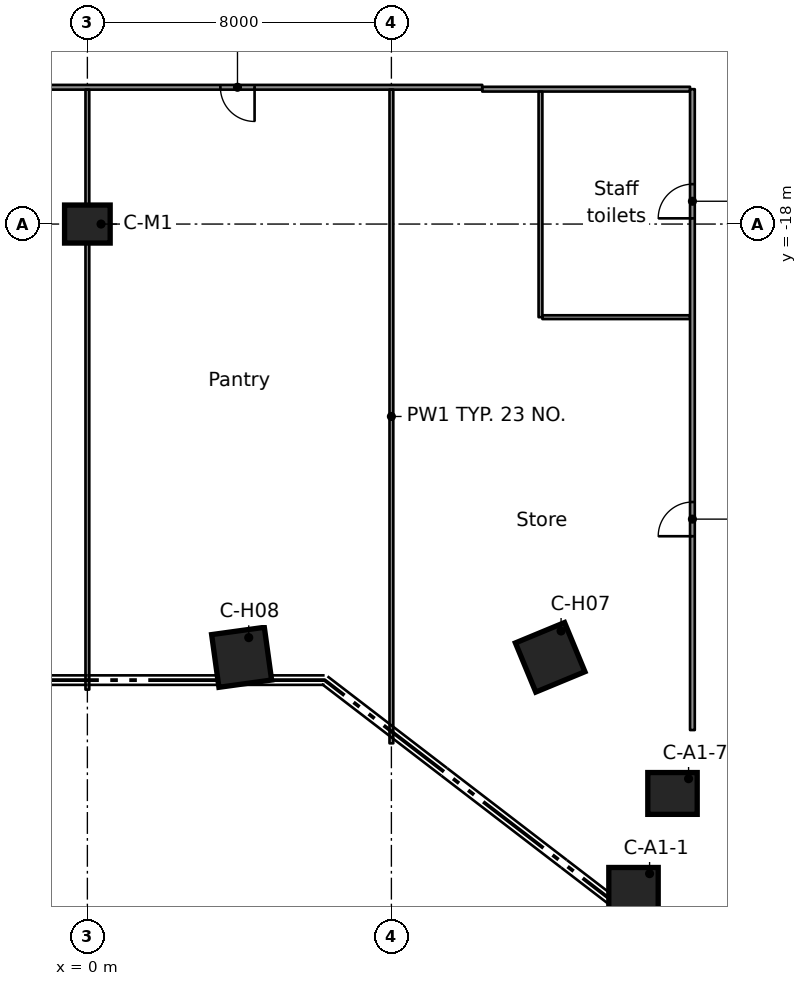
"""IFC4 building model, lengths in metres.
Left out: names, types, materials, properties, quantities, classifications, styles, units other than length and angle.
Written with IfcOpenShell. Run it as: python <this file> out.ifc"""

import sys

from ifc_helpers import new_model, si_unit, direction, frame, frame_2d, origin, origin_2d, place, context, subcontext, project, spatial, rectangle, extrude, element, fill, save


model = new_model("IFC4")
c1 = context("Model", 3, precision=1e-05, world=origin(), true_north=direction((0.0, 1.0)))
c2 = subcontext(c1, "Body", "Model", "MODEL_VIEW")
j1 = project(units=[si_unit("LENGTHUNIT", "METRE"), si_unit("PLANEANGLEUNIT", "RADIAN")], contexts=[c1])
p1 = place(None, origin())
s1 = spatial("IfcSite", under=j1, at=p1, CompositionType="ELEMENT")
p2 = place(p1, origin())
s2 = spatial("IfcBuilding", under=s1, at=p2, CompositionType="ELEMENT")
p3 = place(p2, frame((0.0, 0.0, 15.5)))
s3 = spatial("IfcBuildingStorey", under=s2, at=p3, CompositionType="ELEMENT", Elevation=15.5)
for number, where, z_axis, x_axis in (
    (1, (14.371, -35.48, 0.0), (0.0, 0.0, 1.0), (1.0, 0.0, 0.0)),
    (2, (15.397, -32.982, 0.0), (0.0, 0.0, 1.0), (1.0, 0.0, 0.0)),
):
    element("IfcColumn", number, at=place(p3, frame(where, z_axis=z_axis, x_axis=x_axis)), inside=s3, PredefinedType="COLUMN", context=c2, shape_type="SweptSolid", body=[
        extrude(rectangle(XDim=1.3, YDim=1.1, at=origin_2d()), origin(), (0.0, 0.0, 1.0), 5.0),
    ])
for number, where, z_axis, x_axis in (
    (3, (12.178, -29.4, 0.0), (0.0, 0.0, 1.0), (0.383, -0.924, 0.0)),
    (4, (4.059, -29.4, 0.0), (0.0, 0.0, 1.0), (0.137, -0.991, 0.0)),
):
    element("IfcColumn", number, at=place(p3, frame(where, z_axis=z_axis, x_axis=x_axis)), inside=s3, PredefinedType="COLUMN", context=c2, shape_type="SweptSolid", body=[
        extrude(rectangle(XDim=1.4, YDim=1.4, at=origin_2d()), origin(), (0.0, 0.0, 1.0), 5.0),
    ])
p4 = place(p3, frame((0.0, -18.0, 0.0), z_axis=(0.0, 0.0, 1.0), x_axis=(1.0, 0.0, 0.0)))
e5 = element("IfcColumn", 5, at=p4, inside=s3, PredefinedType="COLUMN", context=c2, shape_type="SweptSolid", body=[
    extrude(rectangle(XDim=1.2, YDim=1.0, at=origin_2d()), origin(), (0.0, 0.0, 1.0), 5.0),
])
p5 = place(p3, frame((11.973, -20.45, 0.0), z_axis=(0.0, 0.0, 1.0), x_axis=(1.0, 0.0, 0.0)))
e6 = element("IfcWall", 6, at=p5, inside=s3, PredefinedType="PARTITIONING", context=c2, shape_type="SweptSolid", body=[
    extrude(rectangle(XDim=3.885, YDim=0.1, at=frame_2d((1.942, 0.0))), origin(), (0.0, 0.0, 1.0), 4.58),
])
p6 = place(p3, frame((10.391, -14.451, 0.0), z_axis=(0.0, 0.0, 1.0), x_axis=(1.0, 0.0, 0.0)))
e7 = element("IfcWall", 7, at=p6, inside=s3, PredefinedType="PARTITIONING", context=c2, shape_type="SweptSolid", body=[
    extrude(rectangle(XDim=5.467, YDim=0.125, at=frame_2d((2.733, 0.0))), origin(), (0.0, 0.0, 1.0), 4.58),
])
p7 = place(p3, frame((10.391, -14.401, 0.0), z_axis=(0.0, 0.0, 1.0), x_axis=(-1.0, 0.0, 0.0)))
e8 = element("IfcWall", 8, at=p7, inside=s3, PredefinedType="PARTITIONING", context=c2, shape_type="SweptSolid", body=[
    extrude(rectangle(XDim=20.781, YDim=0.125, at=frame_2d((10.391, 0.0))), origin(), (0.0, 0.0, 1.0), 4.58),
])
p8 = place(p7, frame((13.991, 0.0, 0.0)))
e9 = element("IfcOpeningElement", 9, at=p8, cuts=e8, PredefinedType="OPENING", context=c2, shape_type="SweptSolid", body=[
    extrude(rectangle(XDim=0.9, YDim=2.1, at=frame_2d((0.45, 1.05))), frame((0.0, 0.073, 0.0), z_axis=(0.0, -1.0, 0.0), x_axis=(1.0, 0.0, 0.0)), (0.0, 0.0, 1.0), 0.145),
])
p9 = place(p7, frame((5.991, 0.0, 0.0)))
e10 = element("IfcOpeningElement", 10, at=p9, cuts=e8, PredefinedType="OPENING", context=c2, shape_type="SweptSolid", body=[
    extrude(rectangle(XDim=0.9, YDim=2.1, at=frame_2d((0.45, 1.05))), frame((0.0, 0.073, 0.0), z_axis=(0.0, -1.0, 0.0), x_axis=(1.0, 0.0, 0.0)), (0.0, 0.0, 1.0), 0.145),
])
p10 = place(p3, frame((15.921, -31.314, 0.0), z_axis=(0.0, 0.0, 1.0), x_axis=(0.0, 1.0, 0.0)))
e11 = element("IfcWall", 11, at=p10, inside=s3, PredefinedType="PARTITIONING", context=c2, shape_type="SweptSolid", body=[
    extrude(rectangle(XDim=16.863, YDim=0.125, at=frame_2d((8.432, 0.0))), origin(), (0.0, 0.0, 1.0), 4.58),
])
p11 = place(p10, frame((5.1, 0.0, 0.0)))
e12 = element("IfcOpeningElement", 12, at=p11, cuts=e11, PredefinedType="OPENING", context=c2, shape_type="SweptSolid", body=[
    extrude(rectangle(XDim=0.9, YDim=2.1, at=frame_2d((0.45, 1.05))), frame((0.0, 0.073, 0.0), z_axis=(0.0, -1.0, 0.0), x_axis=(1.0, 0.0, 0.0)), (0.0, 0.0, 1.0), 0.145),
])
p12 = place(p10, frame((13.464, 0.0, 0.0)))
e13 = element("IfcOpeningElement", 13, at=p12, cuts=e11, PredefinedType="OPENING", context=c2, shape_type="SweptSolid", body=[
    extrude(rectangle(XDim=0.9, YDim=2.1, at=frame_2d((0.45, 1.05))), frame((0.0, 0.073, 0.0), z_axis=(0.0, -1.0, 0.0), x_axis=(1.0, 0.0, 0.0)), (0.0, 0.0, 1.0), 0.145),
])
p13 = place(p3, frame((11.923, -20.45, 0.0), z_axis=(0.0, 0.0, 1.0), x_axis=(0.0, 1.0, 0.0)))
e14 = element("IfcWall", 14, at=p13, inside=s3, PredefinedType="PARTITIONING", context=c2, shape_type="SweptSolid", body=[
    extrude(rectangle(XDim=5.936, YDim=0.1, at=frame_2d((2.968, 0.0))), origin(), (0.0, 0.0, 1.0), 4.58),
])
p14 = place(p3, frame((8.0, -31.663, 0.0), z_axis=(0.0, 0.0, 1.0), x_axis=(0.0, 1.0, 0.0)))
e15 = element("IfcWall", 15, at=p14, inside=s3, PredefinedType="PARTITIONING", context=c2, shape_type="SweptSolid", body=[
    extrude(rectangle(XDim=17.2, YDim=0.1, at=frame_2d((8.6, 0.0))), origin(), (0.0, 0.0, 1.0), 4.58),
])
p15 = place(p3, frame((0.0, -30.25, 0.0), z_axis=(0.0, 0.0, 1.0), x_axis=(0.0, 1.0, 0.0)))
e16 = element("IfcWall", 16, at=p15, inside=s3, PredefinedType="PARTITIONING", context=c2, shape_type="SweptSolid", body=[
    extrude(rectangle(XDim=15.787, YDim=0.1, at=frame_2d((7.894, 0.0))), origin(), (0.0, 0.0, 1.0), 4.58),
])
p16 = place(p9, origin())
e17 = element("IfcDoor", 17, at=p16, inside=s3, OperationType="SINGLE_SWING_LEFT", PredefinedType="DOOR", context=c2, shape_type="SweptSolid", body=[
    extrude(rectangle(XDim=0.9, YDim=2.1, at=frame_2d((0.45, 1.05))), frame((0.0, 0.025, 0.0), z_axis=(0.0, -1.0, 0.0), x_axis=(1.0, 0.0, 0.0)), (0.0, 0.0, 1.0), 0.05),
])
fill(e10, e17)
p17 = place(p11, origin())
e18 = element("IfcDoor", 18, at=p17, inside=s3, OperationType="SINGLE_SWING_LEFT", PredefinedType="DOOR", context=c2, shape_type="SweptSolid", body=[
    extrude(rectangle(XDim=0.9, YDim=2.1, at=frame_2d((0.45, 1.05))), frame((0.0, 0.025, 0.0), z_axis=(0.0, -1.0, 0.0), x_axis=(1.0, 0.0, 0.0)), (0.0, 0.0, 1.0), 0.05),
])
fill(e12, e18)
p18 = place(p12, origin())
e19 = element("IfcDoor", 19, at=p18, inside=s3, OperationType="SINGLE_SWING_RIGHT", PredefinedType="DOOR", context=c2, shape_type="SweptSolid", body=[
    extrude(rectangle(XDim=0.9, YDim=2.1, at=frame_2d((0.45, 1.05))), frame((0.0, 0.025, 0.0), z_axis=(0.0, -1.0, 0.0), x_axis=(1.0, 0.0, 0.0)), (0.0, 0.0, 1.0), 0.05),
])
fill(e13, e19)
save(model, sys.argv[1])
